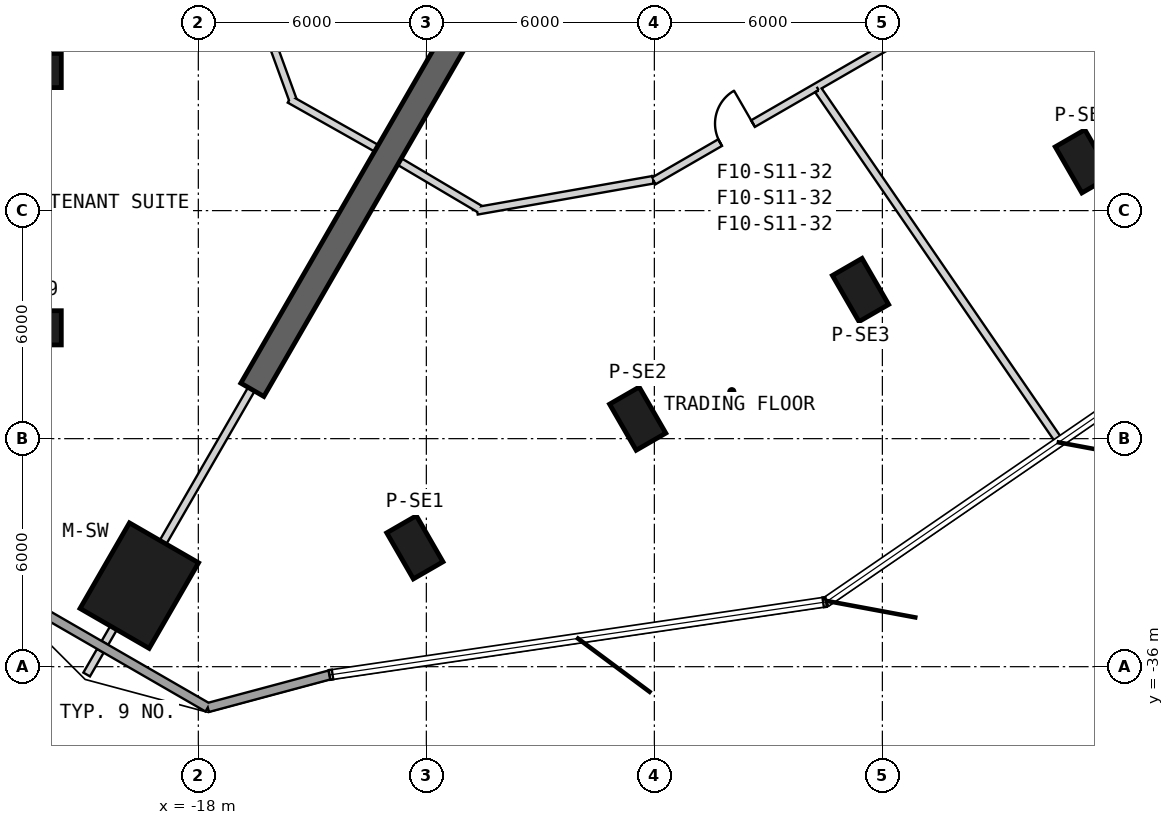
"""IFC4 building model, lengths in metres.
Left out: names, types, materials, properties, quantities, classifications, styles, units other than length and angle.
Written with IfcOpenShell. Run it as: python <this file> out.ifc"""

import sys

from ifc_helpers import new_model, si_unit, direction, frame, frame_2d, origin, origin_2d, place, context, subcontext, project, spatial, rectangle, extrude, element, fill, save


model = new_model("IFC4")
c1 = context("Model", 3, precision=1e-05, world=origin(), true_north=direction((0.0, 1.0)))
c2 = subcontext(c1, "Body", "Model", "MODEL_VIEW")
j1 = project(units=[si_unit("LENGTHUNIT", "METRE"), si_unit("PLANEANGLEUNIT", "RADIAN")], contexts=[c1])
p1 = place(None, origin())
s1 = spatial("IfcSite", under=j1, at=p1, CompositionType="ELEMENT")
p2 = place(p1, origin())
s2 = spatial("IfcBuilding", under=s1, at=p2, CompositionType="ELEMENT")
p3 = place(p2, frame((0.0, 0.0, 193.2)))
s3 = spatial("IfcBuildingStorey", under=s2, at=p3, CompositionType="ELEMENT", Elevation=193.2)
p4 = place(p3, frame((-19.553, -33.867, 0.0), z_axis=(0.0, 0.0, 1.0), x_axis=(-0.5, -0.866025403784, 0.0)))
e1 = element("IfcColumn", 1, at=p4, inside=s3, PredefinedType="COLUMN", context=c2, shape_type="SweptSolid", body=[
    extrude(rectangle(XDim=2.6, YDim=2.1, at=origin_2d()), origin(), (0.0, 0.0, 1.0), 4.0),
])
for number, where, z_axis, x_axis in (
    (2, (-22.306, -20.313, 0.0), (0.0, 0.0, 1.0), (-1.0, 0.0, 0.0)),
    (3, (-22.306, -27.084, 0.0), (0.0, 0.0, 1.0), (-1.0, 0.0, 0.0)),
    (4, (-12.302, -32.859, 0.0), (0.0, 0.0, 1.0), (0.5, -0.866, 0.0)),
    (5, (-6.439, -29.474, 0.0), (0.0, 0.0, 1.0), (0.5, -0.866, 0.0)),
    (6, (-0.575, -26.088, 0.0), (0.0, 0.0, 1.0), (0.5, -0.866, 0.0)),
    (7, (5.289, -22.703, 0.0), (0.0, 0.0, 1.0), (0.5, -0.866, 0.0)),
):
    element("IfcColumn", number, at=place(p3, frame(where, z_axis=z_axis, x_axis=x_axis)), inside=s3, PredefinedType="COLUMN", context=c2, shape_type="SweptSolid", body=[
        extrude(rectangle(XDim=1.4, YDim=0.9, at=origin_2d()), origin(), (0.0, 0.0, 1.0), 4.0),
    ])
p5 = place(p3, frame((-10.575, -18.316, 0.0), z_axis=(0.0, 0.0, 1.0), x_axis=(-0.500001138955, -0.866024746207, 0.0)))
e8 = element("IfcWall", 8, at=p5, inside=s3, PredefinedType="SHEAR", context=c2, shape_type="SweptSolid", body=[
    extrude(rectangle(XDim=12.007, YDim=0.7, at=frame_2d((6.003, 0.0))), origin(), (0.0, 0.0, 1.0), 4.0),
])
p6 = place(p3, frame((-23.233, -33.911, 0.0), z_axis=(0.0, 0.0, 1.0), x_axis=(0.86602503047, -0.5000006466, 0.0)))
e9 = element("IfcWall", 9, at=p6, inside=s3, PredefinedType="SOLIDWALL", context=c2, shape_type="SweptSolid", body=[
    extrude(rectangle(XDim=6.331, YDim=0.24, at=frame_2d((3.165, 0.0))), origin(), (0.0, 0.0, 1.0), 3.7),
])
p7 = place(p3, frame((-17.751, -37.076, 0.0), z_axis=(0.0, 0.0, 1.0), x_axis=(0.965916501562, 0.258853842949, 0.0)))
e10 = element("IfcWall", 10, at=p7, inside=s3, PredefinedType="SOLIDWALL", context=c2, shape_type="SweptSolid", body=[
    extrude(rectangle(XDim=3.316, YDim=0.24, at=frame_2d((1.658, 0.0))), origin(), (0.0, 0.0, 1.0), 3.7),
])
p8 = place(p3, frame((-15.598, -21.072, 0.0), z_axis=(0.0, 0.0, 1.0), x_axis=(0.871234731294, -0.490866624438, 0.0)))
e11 = element("IfcWall", 11, at=p8, inside=s3, PredefinedType="PARTITIONING", context=c2, shape_type="SweptSolid", body=[
    extrude(rectangle(XDim=2.623, YDim=0.2, at=frame_2d((1.311, 0.0))), origin(), (0.0, 0.0, 1.0), 3.7),
])
p9 = place(p3, frame((-17.134, -16.629, 0.0), z_axis=(0.0, 0.0, 1.0), x_axis=(0.342036655594, -0.939686610647, 0.0)))
e12 = element("IfcWall", 12, at=p9, inside=s3, PredefinedType="PARTITIONING", context=c2, shape_type="SweptSolid", body=[
    extrude(rectangle(XDim=4.74, YDim=0.2, at=frame_2d((2.37, 0.0))), origin(), (0.0, 0.0, 1.0), 2.78),
])
p10 = place(p3, frame((-6.019, -23.22, 0.0), z_axis=(0.0, 0.0, 1.0), x_axis=(0.866018215049, 0.500012451049, 0.0)))
e13 = element("IfcWall", 13, at=p10, inside=s3, PredefinedType="PARTITIONING", context=c2, shape_type="SweptSolid", body=[
    extrude(rectangle(XDim=4.955, YDim=0.2, at=frame_2d((2.478, 0.0))), origin(), (0.0, 0.0, 1.0), 2.88),
])
p11 = place(p10, frame((2.02, 0.0, 0.0)))
e14 = element("IfcOpeningElement", 14, at=p11, cuts=e13, PredefinedType="OPENING", context=c2, shape_type="SweptSolid", body=[
    extrude(rectangle(XDim=1.0, YDim=2.1, at=frame_2d((0.5, 1.05))), frame((0.0, 0.11, 0.0), z_axis=(0.0, -1.0, 0.0), x_axis=(1.0, 0.0, 0.0)), (0.0, 0.0, 1.0), 0.22),
])
p12 = place(p3, frame((-1.727, -20.743, 0.0), z_axis=(0.0, 0.0, 1.0), x_axis=(0.866022578741, 0.500004893086, 0.0)))
e15 = element("IfcWall", 15, at=p12, inside=s3, PredefinedType="PARTITIONING", context=c2, shape_type="SweptSolid", body=[
    extrude(rectangle(XDim=13.917, YDim=0.2, at=frame_2d((6.958, 0.0))), origin(), (0.0, 0.0, 1.0), 2.98),
])
p13 = place(p3, frame((-10.665, -24.005, 0.0), z_axis=(0.0, 0.0, 1.0), x_axis=(0.984806532296, 0.173655100553, 0.0)))
e16 = element("IfcWall", 16, at=p13, inside=s3, PredefinedType="PARTITIONING", context=c2, shape_type="SweptSolid", body=[
    extrude(rectangle(XDim=4.706, YDim=0.2, at=frame_2d((2.353, 0.0))), origin(), (0.0, 0.0, 1.0), 2.78),
])
p14 = place(p3, frame((-12.707, -22.709, 0.0), z_axis=(0.0, 0.0, 1.0), x_axis=(0.860754387085, -0.509020515415, 0.0)))
e17 = element("IfcWall", 17, at=p14, inside=s3, PredefinedType="PARTITIONING", context=c2, shape_type="SweptSolid", body=[
    extrude(rectangle(XDim=2.457, YDim=0.2, at=frame_2d((1.229, 0.0))), origin(), (0.0, 0.0, 1.0), 3.7),
])
p15 = place(p3, frame((-20.938, -36.206, 0.0), z_axis=(0.0, 0.0, 1.0), x_axis=(0.49996696679, 0.866044474677, 0.0)))
e18 = element("IfcWall", 18, at=p15, inside=s3, PredefinedType="PARTITIONING", context=c2, shape_type="SweptSolid", body=[
    extrude(rectangle(XDim=0.72, YDim=0.2, at=frame_2d((0.36, 0.0))), origin(), (0.0, 0.0, 1.0), 3.7),
])
p16 = place(p3, frame((-20.458, -35.375, 0.0), z_axis=(0.0, 0.0, 1.0), x_axis=(0.500384246316, 0.865803445384, 0.0)))
e19 = element("IfcWall", 19, at=p16, inside=s3, PredefinedType="PARTITIONING", context=c2, shape_type="SweptSolid", body=[
    extrude(rectangle(XDim=0.458, YDim=0.2, at=frame_2d((0.229, 0.0))), origin(), (0.0, 0.0, 1.0), 3.7),
])
p17 = place(p3, frame((-18.929, -32.727, 0.0), z_axis=(0.0, 0.0, 1.0), x_axis=(0.500007271693, 0.86602120543, 0.0)))
e20 = element("IfcWall", 20, at=p17, inside=s3, PredefinedType="PARTITIONING", context=c2, shape_type="SweptSolid", body=[
    extrude(rectangle(XDim=4.65, YDim=0.2, at=frame_2d((2.325, 0.0))), origin(), (0.0, 0.0, 1.0), 3.27),
])
p18 = place(p3, frame((4.662, -30.081, 0.0), z_axis=(0.0, 0.0, 1.0), x_axis=(-0.565886599798, 0.824483084223, 0.0)))
e21 = element("IfcWall", 21, at=p18, inside=s3, PredefinedType="PARTITIONING", context=c2, shape_type="SweptSolid", body=[
    extrude(rectangle(XDim=11.216, YDim=0.2, at=frame_2d((5.608, 0.0))), origin(), (0.0, 0.0, 1.0), 2.98),
])
p19 = place(p11, origin())
e22 = element("IfcDoor", 22, at=p19, inside=s3, OperationType="SINGLE_SWING_RIGHT", PredefinedType="USERDEFINED", context=c2, shape_type="SweptSolid", body=[
    extrude(rectangle(XDim=1.0, YDim=2.1, at=frame_2d((0.5, 1.05))), frame((0.0, 0.025, 0.0), z_axis=(0.0, -1.0, 0.0), x_axis=(1.0, 0.0, 0.0)), (0.0, 0.0, 1.0), 0.05),
])
fill(e14, e22)
save(model, sys.argv[1])
